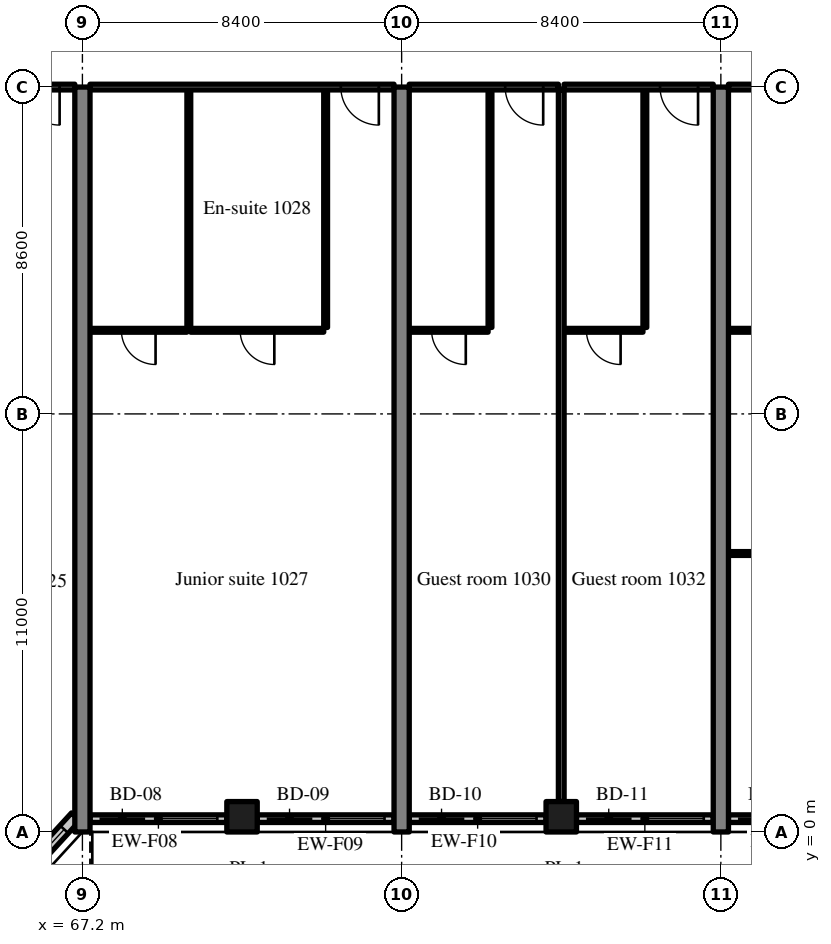
"""IFC4 building model, lengths in metres.
Left out: names, types, materials, properties, quantities, classifications, styles, units other than length and angle.
Written with IfcOpenShell. Run it as: python <this file> out.ifc"""

import sys

from ifc_helpers import new_model, si_unit, direction, frame, frame_2d, origin, origin_2d, place, context, subcontext, project, spatial, rectangle, extrude, source, transform, mapped, element, fill, save


model = new_model("IFC4")
c1 = context("Model", 3, precision=1e-05, world=origin(), true_north=direction((0.0, 1.0)))
c2 = subcontext(c1, "Body", "Model", "MODEL_VIEW")
j1 = project(units=[si_unit("LENGTHUNIT", "METRE"), si_unit("PLANEANGLEUNIT", "RADIAN")], contexts=[c1])
p1 = place(None, origin())
s1 = spatial("IfcSite", under=j1, at=p1, CompositionType="ELEMENT")
p2 = place(p1, origin())
s2 = spatial("IfcBuilding", under=s1, at=p2, CompositionType="ELEMENT")
p3 = place(p2, frame((0.0, 0.0, 46.8)))
s3 = spatial("IfcBuildingStorey", under=s2, at=p3, CompositionType="ELEMENT", Elevation=46.8)
m1 = source(origin(), c2, "Body", "SweptSolid", [
    extrude(rectangle(XDim=19.6, YDim=0.4, at=frame_2d((9.8, 0.0))), origin(), (0.0, 0.0, 1.0), 3.52),
])
for number, where, z_axis, x_axis in (
    (1, (67.2, 0.0, 0.0), (0.0, 0.0, 1.0), (0.0, 1.0, 0.0)),
    (2, (75.6, 0.0, 0.0), (0.0, 0.0, 1.0), (0.0, 1.0, 0.0)),
    (3, (84.0, 0.0, 0.0), (0.0, 0.0, 1.0), (0.0, 1.0, 0.0)),
):
    element("IfcWall", number, at=place(p3, frame(where, z_axis=z_axis, x_axis=x_axis)), inside=s3, PredefinedType="SHEAR", context=c2, shape_type="MappedRepresentation", body=[
        mapped(m1, transform((0.0, 0.0, 0.0), scale=1.0)),
    ])
m2 = source(origin(), c2, "Body", "SweptSolid", [
    extrude(rectangle(XDim=0.8, YDim=0.8, at=origin_2d()), origin(), (0.0, 0.0, 1.0), 3.52),
])
for number, where, z_axis, x_axis in (
    (4, (71.4, 0.4, 0.0), (0.0, 0.0, 1.0), (1.0, 0.0, 0.0)),
    (5, (79.8, 0.4, 0.0), (0.0, 0.0, 1.0), (1.0, 0.0, 0.0)),
):
    element("IfcColumn", number, at=place(p3, frame(where, z_axis=z_axis, x_axis=x_axis)), inside=s3, PredefinedType="COLUMN", context=c2, shape_type="MappedRepresentation", body=[
        mapped(m2, transform((0.0, 0.0, 0.0), scale=1.0)),
    ])
m3 = source(origin(), c2, "Body", "SweptSolid", [
    extrude(rectangle(XDim=2.398, YDim=0.3, at=frame_2d((1.199, 0.0))), origin(), (0.0, 0.0, 1.0), 3.52),
])
p4 = place(p3, frame((65.404, -1.369, 0.0), z_axis=(0.0, 0.0, 1.0), x_axis=(0.675374189419, 0.737475222815, 0.0)))
e6 = element("IfcWall", 6, at=p4, inside=s3, PredefinedType="SOLIDWALL", context=c2, shape_type="MappedRepresentation", body=[
    mapped(m3, transform((0.0, 0.0, 0.0), scale=1.0)),
])
m4 = source(origin(), c2, "Body", "SweptSolid", [
    extrude(rectangle(XDim=1.5, YDim=2.0, at=frame_2d((0.75, 1.0))), frame((0.0, 0.16, 0.0), z_axis=(0.0, -1.0, 0.0), x_axis=(1.0, 0.0, 0.0)), (0.0, 0.0, 1.0), 0.32),
])
p5 = place(p4, frame((0.449, 0.0, 0.9)))
e7 = element("IfcOpeningElement", 7, at=p5, cuts=e6, PredefinedType="OPENING", context=c2, shape_type="MappedRepresentation", body=[
    mapped(m4, transform((0.0, 0.0, 0.0), scale=1.0)),
])
m5 = source(origin(), c2, "Body", "SweptSolid", [
    extrude(rectangle(XDim=3.6, YDim=0.2, at=frame_2d((1.8, 0.0))), origin(), (0.0, 0.0, 1.0), 2.82),
])
p6 = place(p3, frame((67.4, 0.35, 0.0), z_axis=(0.0, 0.0, 1.0), x_axis=(1.0, 0.0, 0.0)))
e8 = element("IfcWall", 8, at=p6, inside=s3, PredefinedType="SOLIDWALL", context=c2, shape_type="MappedRepresentation", body=[
    mapped(m5, transform((0.0, 0.0, 0.0), scale=1.0)),
])
m6 = source(origin(), c2, "Body", "SweptSolid", [
    extrude(rectangle(XDim=1.2, YDim=2.4, at=frame_2d((0.6, 1.2))), frame((0.0, 0.11, 0.0), z_axis=(0.0, -1.0, 0.0), x_axis=(1.0, 0.0, 0.0)), (0.0, 0.0, 1.0), 0.22),
])
p7 = place(p6, frame((0.25, 0.0, 0.0)))
e9 = element("IfcOpeningElement", 9, at=p7, cuts=e8, PredefinedType="OPENING", context=c2, shape_type="MappedRepresentation", body=[
    mapped(m6, transform((0.0, 0.0, 0.0), scale=1.0)),
])
m7 = source(origin(), c2, "Body", "SweptSolid", [
    extrude(rectangle(XDim=1.5, YDim=1.5, at=frame_2d((0.75, 0.75))), frame((0.0, 0.11, 0.0), z_axis=(0.0, -1.0, 0.0), x_axis=(1.0, 0.0, 0.0)), (0.0, 0.0, 1.0), 0.22),
])
p8 = place(p6, frame((1.85, 0.0, 0.9)))
e10 = element("IfcOpeningElement", 10, at=p8, cuts=e8, PredefinedType="OPENING", context=c2, shape_type="MappedRepresentation", body=[
    mapped(m7, transform((0.0, 0.0, 0.0), scale=1.0)),
])
m8 = source(origin(), c2, "Body", "SweptSolid", [
    extrude(rectangle(XDim=3.6, YDim=0.2, at=frame_2d((1.8, 0.0))), origin(), (0.0, 0.0, 1.0), 2.82),
])
p9 = place(p3, frame((71.8, 0.35, 0.0), z_axis=(0.0, 0.0, 1.0), x_axis=(1.0, 0.0, 0.0)))
e11 = element("IfcWall", 11, at=p9, inside=s3, PredefinedType="SOLIDWALL", context=c2, shape_type="MappedRepresentation", body=[
    mapped(m8, transform((0.0, 0.0, 0.0), scale=1.0)),
])
p10 = place(p9, frame((0.25, 0.0, 0.0)))
e12 = element("IfcOpeningElement", 12, at=p10, cuts=e11, PredefinedType="OPENING", context=c2, shape_type="MappedRepresentation", body=[
    mapped(m6, transform((0.0, 0.0, 0.0), scale=1.0)),
])
p11 = place(p9, frame((1.85, 0.0, 0.9)))
e13 = element("IfcOpeningElement", 13, at=p11, cuts=e11, PredefinedType="OPENING", context=c2, shape_type="MappedRepresentation", body=[
    mapped(m7, transform((0.0, 0.0, 0.0), scale=1.0)),
])
p12 = place(p3, frame((75.8, 0.35, 0.0), z_axis=(0.0, 0.0, 1.0), x_axis=(1.0, 0.0, 0.0)))
e14 = element("IfcWall", 14, at=p12, inside=s3, PredefinedType="SOLIDWALL", context=c2, shape_type="MappedRepresentation", body=[
    mapped(m8, transform((0.0, 0.0, 0.0), scale=1.0)),
])
p13 = place(p12, frame((0.25, 0.0, 0.0)))
e15 = element("IfcOpeningElement", 15, at=p13, cuts=e14, PredefinedType="OPENING", context=c2, shape_type="MappedRepresentation", body=[
    mapped(m6, transform((0.0, 0.0, 0.0), scale=1.0)),
])
p14 = place(p12, frame((1.85, 0.0, 0.9)))
e16 = element("IfcOpeningElement", 16, at=p14, cuts=e14, PredefinedType="OPENING", context=c2, shape_type="MappedRepresentation", body=[
    mapped(m7, transform((0.0, 0.0, 0.0), scale=1.0)),
])
p15 = place(p3, frame((80.2, 0.35, 0.0), z_axis=(0.0, 0.0, 1.0), x_axis=(1.0, 0.0, 0.0)))
e17 = element("IfcWall", 17, at=p15, inside=s3, PredefinedType="SOLIDWALL", context=c2, shape_type="MappedRepresentation", body=[
    mapped(m5, transform((0.0, 0.0, 0.0), scale=1.0)),
])
p16 = place(p15, frame((0.25, 0.0, 0.0)))
e18 = element("IfcOpeningElement", 18, at=p16, cuts=e17, PredefinedType="OPENING", context=c2, shape_type="MappedRepresentation", body=[
    mapped(m6, transform((0.0, 0.0, 0.0), scale=1.0)),
])
p17 = place(p15, frame((1.85, 0.0, 0.9)))
e19 = element("IfcOpeningElement", 19, at=p17, cuts=e17, PredefinedType="OPENING", context=c2, shape_type="MappedRepresentation", body=[
    mapped(m7, transform((0.0, 0.0, 0.0), scale=1.0)),
])
p18 = place(p3, frame((84.2, 0.35, 0.0), z_axis=(0.0, 0.0, 1.0), x_axis=(1.0, 0.0, 0.0)))
e20 = element("IfcWall", 20, at=p18, inside=s3, PredefinedType="SOLIDWALL", context=c2, shape_type="MappedRepresentation", body=[
    mapped(m5, transform((0.0, 0.0, 0.0), scale=1.0)),
])
p19 = place(p18, frame((0.25, 0.0, 0.0)))
e21 = element("IfcOpeningElement", 21, at=p19, cuts=e20, PredefinedType="OPENING", context=c2, shape_type="MappedRepresentation", body=[
    mapped(m6, transform((0.0, 0.0, 0.0), scale=1.0)),
])
p20 = place(p18, frame((1.85, 0.0, 0.9)))
e22 = element("IfcOpeningElement", 22, at=p20, cuts=e20, PredefinedType="OPENING", context=c2, shape_type="MappedRepresentation", body=[
    mapped(m7, transform((0.0, 0.0, 0.0), scale=1.0)),
])
m9 = source(origin(), c2, "Body", "SweptSolid", [
    extrude(rectangle(XDim=3.925, YDim=0.15, at=frame_2d((1.962, 0.0))), origin(), (0.0, 0.0, 1.0), 2.82),
])
p21 = place(p3, frame((63.075, 19.6, 0.0), z_axis=(0.0, 0.0, 1.0), x_axis=(1.0, 0.0, 0.0)))
e23 = element("IfcWall", 23, at=p21, inside=s3, PredefinedType="PARTITIONING", context=c2, shape_type="MappedRepresentation", body=[
    mapped(m9, transform((0.0, 0.0, 0.0), scale=1.0)),
])
m10 = source(origin(), c2, "Body", "SweptSolid", [
    extrude(rectangle(XDim=1.0, YDim=2.1, at=frame_2d((0.5, 1.05))), frame((0.0, 0.085, 0.0), z_axis=(0.0, -1.0, 0.0), x_axis=(1.0, 0.0, 0.0)), (0.0, 0.0, 1.0), 0.17),
])
p22 = place(p21, frame((2.525, 0.0, 0.0)))
e24 = element("IfcOpeningElement", 24, at=p22, cuts=e23, PredefinedType="OPENING", context=c2, shape_type="MappedRepresentation", body=[
    mapped(m10, transform((0.0, 0.0, 0.0), scale=1.0)),
])
m11 = source(origin(), c2, "Body", "SweptSolid", [
    extrude(rectangle(XDim=6.25, YDim=0.1, at=frame_2d((3.125, 0.0))), origin(), (0.0, 0.0, 1.0), 3.52),
])
for number, where, z_axis, x_axis in (
    (25, (73.6, 13.275, 0.0), (0.0, 0.0, 1.0), (0.0, 1.0, 0.0)),
    (26, (70.0, 13.275, 0.0), (0.0, 0.0, 1.0), (0.0, 1.0, 0.0)),
):
    element("IfcWall", number, at=place(p3, frame(where, z_axis=z_axis, x_axis=x_axis)), inside=s3, PredefinedType="PARTITIONING", context=c2, shape_type="MappedRepresentation", body=[
        mapped(m11, transform((0.0, 0.0, 0.0), scale=1.0)),
    ])
m12 = source(origin(), c2, "Body", "SweptSolid", [
    extrude(rectangle(XDim=3.5, YDim=0.1, at=frame_2d((1.75, 0.0))), origin(), (0.0, 0.0, 1.0), 3.52),
])
p23 = place(p3, frame((70.05, 13.2, 0.0), z_axis=(0.0, 0.0, 1.0), x_axis=(1.0, 0.0, 0.0)))
e27 = element("IfcWall", 27, at=p23, inside=s3, PredefinedType="PARTITIONING", context=c2, shape_type="MappedRepresentation", body=[
    mapped(m12, transform((0.0, 0.0, 0.0), scale=1.0)),
])
m13 = source(origin(), c2, "Body", "SweptSolid", [
    extrude(rectangle(XDim=0.9, YDim=2.1, at=frame_2d((0.45, 1.05))), frame((0.0, 0.06, 0.0), z_axis=(0.0, -1.0, 0.0), x_axis=(1.0, 0.0, 0.0)), (0.0, 0.0, 1.0), 0.12),
])
p24 = place(p23, frame((1.3, 0.0, 0.0)))
e28 = element("IfcOpeningElement", 28, at=p24, cuts=e27, PredefinedType="OPENING", context=c2, shape_type="MappedRepresentation", body=[
    mapped(m13, transform((0.0, 0.0, 0.0), scale=1.0)),
])
m14 = source(origin(), c2, "Body", "SweptSolid", [
    extrude(rectangle(XDim=2.55, YDim=0.1, at=frame_2d((1.275, 0.0))), origin(), (0.0, 0.0, 1.0), 3.52),
])
p25 = place(p3, frame((67.4, 13.2, 0.0), z_axis=(0.0, 0.0, 1.0), x_axis=(1.0, 0.0, 0.0)))
e29 = element("IfcWall", 29, at=p25, inside=s3, PredefinedType="PARTITIONING", context=c2, shape_type="MappedRepresentation", body=[
    mapped(m14, transform((0.0, 0.0, 0.0), scale=1.0)),
])
p26 = place(p25, frame((0.825, 0.0, 0.0)))
e30 = element("IfcOpeningElement", 30, at=p26, cuts=e29, PredefinedType="OPENING", context=c2, shape_type="MappedRepresentation", body=[
    mapped(m13, transform((0.0, 0.0, 0.0), scale=1.0)),
])
m15 = source(origin(), c2, "Body", "SweptSolid", [
    extrude(rectangle(XDim=8.0, YDim=0.15, at=frame_2d((4.0, 0.0))), origin(), (0.0, 0.0, 1.0), 2.82),
])
p27 = place(p3, frame((67.4, 19.6, 0.0), z_axis=(0.0, 0.0, 1.0), x_axis=(1.0, 0.0, 0.0)))
e31 = element("IfcWall", 31, at=p27, inside=s3, PredefinedType="PARTITIONING", context=c2, shape_type="MappedRepresentation", body=[
    mapped(m15, transform((0.0, 0.0, 0.0), scale=1.0)),
])
p28 = place(p27, frame((6.6, 0.0, 0.0)))
e32 = element("IfcOpeningElement", 32, at=p28, cuts=e31, PredefinedType="OPENING", context=c2, shape_type="MappedRepresentation", body=[
    mapped(m10, transform((0.0, 0.0, 0.0), scale=1.0)),
])
p29 = place(p3, frame((77.925, 13.275, 0.0), z_axis=(0.0, 0.0, 1.0), x_axis=(0.0, 1.0, 0.0)))
e33 = element("IfcWall", 33, at=p29, inside=s3, PredefinedType="PARTITIONING", context=c2, shape_type="MappedRepresentation", body=[
    mapped(m11, transform((0.0, 0.0, 0.0), scale=1.0)),
])
m16 = source(origin(), c2, "Body", "SweptSolid", [
    extrude(rectangle(XDim=2.075, YDim=0.1, at=frame_2d((1.038, 0.0))), origin(), (0.0, 0.0, 1.0), 3.52),
])
p30 = place(p3, frame((75.8, 13.2, 0.0), z_axis=(0.0, 0.0, 1.0), x_axis=(1.0, 0.0, 0.0)))
e34 = element("IfcWall", 34, at=p30, inside=s3, PredefinedType="PARTITIONING", context=c2, shape_type="MappedRepresentation", body=[
    mapped(m16, transform((0.0, 0.0, 0.0), scale=1.0)),
])
p31 = place(p30, frame((0.588, 0.0, 0.0)))
e35 = element("IfcOpeningElement", 35, at=p31, cuts=e34, PredefinedType="OPENING", context=c2, shape_type="MappedRepresentation", body=[
    mapped(m13, transform((0.0, 0.0, 0.0), scale=1.0)),
])
p32 = place(p3, frame((75.8, 19.6, 0.0), z_axis=(0.0, 0.0, 1.0), x_axis=(1.0, 0.0, 0.0)))
e36 = element("IfcWall", 36, at=p32, inside=s3, PredefinedType="PARTITIONING", context=c2, shape_type="MappedRepresentation", body=[
    mapped(m9, transform((0.0, 0.0, 0.0), scale=1.0)),
])
p33 = place(p32, frame((2.525, 0.0, 0.0)))
e37 = element("IfcOpeningElement", 37, at=p33, cuts=e36, PredefinedType="OPENING", context=c2, shape_type="MappedRepresentation", body=[
    mapped(m10, transform((0.0, 0.0, 0.0), scale=1.0)),
])
p34 = place(p3, frame((82.0, 13.275, 0.0), z_axis=(0.0, 0.0, 1.0), x_axis=(0.0, 1.0, 0.0)))
e38 = element("IfcWall", 38, at=p34, inside=s3, PredefinedType="PARTITIONING", context=c2, shape_type="MappedRepresentation", body=[
    mapped(m11, transform((0.0, 0.0, 0.0), scale=1.0)),
])
p35 = place(p3, frame((79.875, 13.2, 0.0), z_axis=(0.0, 0.0, 1.0), x_axis=(1.0, 0.0, 0.0)))
e39 = element("IfcWall", 39, at=p35, inside=s3, PredefinedType="PARTITIONING", context=c2, shape_type="MappedRepresentation", body=[
    mapped(m16, transform((0.0, 0.0, 0.0), scale=1.0)),
])
p36 = place(p35, frame((0.587, 0.0, 0.0)))
e40 = element("IfcOpeningElement", 40, at=p36, cuts=e39, PredefinedType="OPENING", context=c2, shape_type="MappedRepresentation", body=[
    mapped(m13, transform((0.0, 0.0, 0.0), scale=1.0)),
])
p37 = place(p3, frame((79.875, 19.6, 0.0), z_axis=(0.0, 0.0, 1.0), x_axis=(1.0, 0.0, 0.0)))
e41 = element("IfcWall", 41, at=p37, inside=s3, PredefinedType="PARTITIONING", context=c2, shape_type="MappedRepresentation", body=[
    mapped(m9, transform((0.0, 0.0, 0.0), scale=1.0)),
])
p38 = place(p37, frame((2.525, 0.0, 0.0)))
e42 = element("IfcOpeningElement", 42, at=p38, cuts=e41, PredefinedType="OPENING", context=c2, shape_type="MappedRepresentation", body=[
    mapped(m10, transform((0.0, 0.0, 0.0), scale=1.0)),
])
m17 = source(origin(), c2, "Body", "SweptSolid", [
    extrude(rectangle(XDim=18.725, YDim=0.15, at=frame_2d((9.362, 0.0))), origin(), (0.0, 0.0, 1.0), 3.52),
])
p39 = place(p3, frame((79.8, 0.8, 0.0), z_axis=(0.0, 0.0, 1.0), x_axis=(0.0, 1.0, 0.0)))
e43 = element("IfcWall", 43, at=p39, inside=s3, PredefinedType="PARTITIONING", context=c2, shape_type="MappedRepresentation", body=[
    mapped(m17, transform((0.0, 0.0, 0.0), scale=1.0)),
])
p40 = place(p3, frame((84.2, 13.2, 0.0), z_axis=(0.0, 0.0, 1.0), x_axis=(1.0, 0.0, 0.0)))
e44 = element("IfcWall", 44, at=p40, inside=s3, PredefinedType="PARTITIONING", context=c2, shape_type="MappedRepresentation", body=[
    mapped(m14, transform((0.0, 0.0, 0.0), scale=1.0)),
])
p41 = place(p40, frame((0.825, 0.0, 0.0)))
e45 = element("IfcOpeningElement", 45, at=p41, cuts=e44, PredefinedType="OPENING", context=c2, shape_type="MappedRepresentation", body=[
    mapped(m13, transform((0.0, 0.0, 0.0), scale=1.0)),
])
m18 = source(origin(), c2, "Body", "SweptSolid", [
    extrude(rectangle(XDim=8.0, YDim=0.1, at=frame_2d((4.0, 0.0))), origin(), (0.0, 0.0, 1.0), 3.52),
])
p42 = place(p3, frame((84.2, 7.327, 0.0), z_axis=(0.0, 0.0, 1.0), x_axis=(1.0, 0.0, 0.0)))
e46 = element("IfcWall", 46, at=p42, inside=s3, PredefinedType="PARTITIONING", context=c2, shape_type="MappedRepresentation", body=[
    mapped(m18, transform((0.0, 0.0, 0.0), scale=1.0)),
])
m19 = source(origin(), c2, "Body", "SweptSolid", [
    extrude(rectangle(XDim=1.8, YDim=2.1, at=frame_2d((0.9, 1.05))), frame((0.0, 0.06, 0.0), z_axis=(0.0, -1.0, 0.0), x_axis=(1.0, 0.0, 0.0)), (0.0, 0.0, 1.0), 0.12),
])
p43 = place(p42, frame((3.1, 0.0, 0.0)))
e47 = element("IfcOpeningElement", 47, at=p43, cuts=e46, PredefinedType="OPENING", context=c2, shape_type="MappedRepresentation", body=[
    mapped(m19, transform((0.0, 0.0, 0.0), scale=1.0)),
])
p44 = place(p3, frame((84.2, 19.6, 0.0), z_axis=(0.0, 0.0, 1.0), x_axis=(1.0, 0.0, 0.0)))
e48 = element("IfcWall", 48, at=p44, inside=s3, PredefinedType="PARTITIONING", context=c2, shape_type="MappedRepresentation", body=[
    mapped(m15, transform((0.0, 0.0, 0.0), scale=1.0)),
])
p45 = place(p44, frame((6.6, 0.0, 0.0)))
e49 = element("IfcOpeningElement", 49, at=p45, cuts=e48, PredefinedType="OPENING", context=c2, shape_type="MappedRepresentation", body=[
    mapped(m10, transform((0.0, 0.0, 0.0), scale=1.0)),
])
m20 = source(origin(), c2, "Body", "SweptSolid", [
    extrude(rectangle(XDim=1.5, YDim=2.0, at=frame_2d((0.75, 1.0))), frame((0.0, 0.03, 0.0), z_axis=(0.0, -1.0, 0.0), x_axis=(1.0, 0.0, 0.0)), (0.0, 0.0, 1.0), 0.06),
])
p46 = place(p5, origin())
e50 = element("IfcWindow", 50, at=p46, inside=s3, PartitioningType="SINGLE_PANEL", PredefinedType="WINDOW", context=c2, shape_type="MappedRepresentation", body=[
    mapped(m20, transform((0.0, 0.0, 0.0), scale=1.0)),
])
fill(e7, e50)
m21 = source(origin(), c2, "Body", "SweptSolid", [
    extrude(rectangle(XDim=1.2, YDim=2.4, at=frame_2d((0.6, 1.2))), frame((0.0, 0.025, 0.0), z_axis=(0.0, -1.0, 0.0), x_axis=(1.0, 0.0, 0.0)), (0.0, 0.0, 1.0), 0.05),
])
p47 = place(p7, origin())
e51 = element("IfcDoor", 51, at=p47, inside=s3, OperationType="SLIDING_TO_RIGHT", PredefinedType="DOOR", context=c2, shape_type="MappedRepresentation", body=[
    mapped(m21, transform((0.0, 0.0, 0.0), scale=1.0)),
])
fill(e9, e51)
m22 = source(origin(), c2, "Body", "SweptSolid", [
    extrude(rectangle(XDim=1.5, YDim=1.5, at=frame_2d((0.75, 0.75))), frame((0.0, 0.03, 0.0), z_axis=(0.0, -1.0, 0.0), x_axis=(1.0, 0.0, 0.0)), (0.0, 0.0, 1.0), 0.06),
])
p48 = place(p8, origin())
e52 = element("IfcWindow", 52, at=p48, inside=s3, PartitioningType="SINGLE_PANEL", PredefinedType="WINDOW", context=c2, shape_type="MappedRepresentation", body=[
    mapped(m22, transform((0.0, 0.0, 0.0), scale=1.0)),
])
fill(e10, e52)
p49 = place(p10, origin())
e53 = element("IfcDoor", 53, at=p49, inside=s3, OperationType="SLIDING_TO_LEFT", PredefinedType="DOOR", context=c2, shape_type="MappedRepresentation", body=[
    mapped(m21, transform((0.0, 0.0, 0.0), scale=1.0)),
])
fill(e12, e53)
p50 = place(p11, origin())
e54 = element("IfcWindow", 54, at=p50, inside=s3, PartitioningType="SINGLE_PANEL", PredefinedType="WINDOW", context=c2, shape_type="MappedRepresentation", body=[
    mapped(m22, transform((0.0, 0.0, 0.0), scale=1.0)),
])
fill(e13, e54)
p51 = place(p13, origin())
e55 = element("IfcDoor", 55, at=p51, inside=s3, OperationType="SLIDING_TO_RIGHT", PredefinedType="DOOR", context=c2, shape_type="MappedRepresentation", body=[
    mapped(m21, transform((0.0, 0.0, 0.0), scale=1.0)),
])
fill(e15, e55)
p52 = place(p14, origin())
e56 = element("IfcWindow", 56, at=p52, inside=s3, PartitioningType="SINGLE_PANEL", PredefinedType="WINDOW", context=c2, shape_type="MappedRepresentation", body=[
    mapped(m22, transform((0.0, 0.0, 0.0), scale=1.0)),
])
fill(e16, e56)
p53 = place(p16, origin())
e57 = element("IfcDoor", 57, at=p53, inside=s3, OperationType="SLIDING_TO_LEFT", PredefinedType="DOOR", context=c2, shape_type="MappedRepresentation", body=[
    mapped(m21, transform((0.0, 0.0, 0.0), scale=1.0)),
])
fill(e18, e57)
p54 = place(p17, origin())
e58 = element("IfcWindow", 58, at=p54, inside=s3, PartitioningType="SINGLE_PANEL", PredefinedType="WINDOW", context=c2, shape_type="MappedRepresentation", body=[
    mapped(m22, transform((0.0, 0.0, 0.0), scale=1.0)),
])
fill(e19, e58)
p55 = place(p19, origin())
e59 = element("IfcDoor", 59, at=p55, inside=s3, OperationType="SLIDING_TO_RIGHT", PredefinedType="DOOR", context=c2, shape_type="MappedRepresentation", body=[
    mapped(m21, transform((0.0, 0.0, 0.0), scale=1.0)),
])
fill(e21, e59)
m23 = source(origin(), c2, "Body", "SweptSolid", [
    extrude(rectangle(XDim=1.0, YDim=2.1, at=frame_2d((0.5, 1.05))), frame((0.0, 0.025, 0.0), z_axis=(0.0, -1.0, 0.0), x_axis=(1.0, 0.0, 0.0)), (0.0, 0.0, 1.0), 0.05),
])
p56 = place(p22, origin())
e60 = element("IfcDoor", 60, at=p56, inside=s3, OperationType="SINGLE_SWING_RIGHT", PredefinedType="DOOR", context=c2, shape_type="MappedRepresentation", body=[
    mapped(m23, transform((0.0, 0.0, 0.0), scale=1.0)),
])
fill(e24, e60)
m24 = source(origin(), c2, "Body", "SweptSolid", [
    extrude(rectangle(XDim=0.9, YDim=2.1, at=frame_2d((0.45, 1.05))), frame((0.0, 0.025, 0.0), z_axis=(0.0, -1.0, 0.0), x_axis=(1.0, 0.0, 0.0)), (0.0, 0.0, 1.0), 0.05),
])
p57 = place(p24, origin())
e61 = element("IfcDoor", 61, at=p57, inside=s3, OperationType="SINGLE_SWING_RIGHT", PredefinedType="DOOR", context=c2, shape_type="MappedRepresentation", body=[
    mapped(m24, transform((0.0, 0.0, 0.0), scale=1.0)),
])
fill(e28, e61)
p58 = place(p26, origin())
e62 = element("IfcDoor", 62, at=p58, inside=s3, OperationType="SINGLE_SWING_RIGHT", PredefinedType="DOOR", context=c2, shape_type="MappedRepresentation", body=[
    mapped(m24, transform((0.0, 0.0, 0.0), scale=1.0)),
])
fill(e30, e62)
p59 = place(p28, origin())
e63 = element("IfcDoor", 63, at=p59, inside=s3, OperationType="SINGLE_SWING_RIGHT", PredefinedType="DOOR", context=c2, shape_type="MappedRepresentation", body=[
    mapped(m23, transform((0.0, 0.0, 0.0), scale=1.0)),
])
fill(e32, e63)
p60 = place(p31, origin())
e64 = element("IfcDoor", 64, at=p60, inside=s3, OperationType="SINGLE_SWING_RIGHT", PredefinedType="DOOR", context=c2, shape_type="MappedRepresentation", body=[
    mapped(m24, transform((0.0, 0.0, 0.0), scale=1.0)),
])
fill(e35, e64)
p61 = place(p33, origin())
e65 = element("IfcDoor", 65, at=p61, inside=s3, OperationType="SINGLE_SWING_RIGHT", PredefinedType="DOOR", context=c2, shape_type="MappedRepresentation", body=[
    mapped(m23, transform((0.0, 0.0, 0.0), scale=1.0)),
])
fill(e37, e65)
p62 = place(p36, origin())
e66 = element("IfcDoor", 66, at=p62, inside=s3, OperationType="SINGLE_SWING_RIGHT", PredefinedType="DOOR", context=c2, shape_type="MappedRepresentation", body=[
    mapped(m24, transform((0.0, 0.0, 0.0), scale=1.0)),
])
fill(e40, e66)
p63 = place(p38, origin())
e67 = element("IfcDoor", 67, at=p63, inside=s3, OperationType="SINGLE_SWING_RIGHT", PredefinedType="DOOR", context=c2, shape_type="MappedRepresentation", body=[
    mapped(m23, transform((0.0, 0.0, 0.0), scale=1.0)),
])
fill(e42, e67)
save(model, sys.argv[1])
